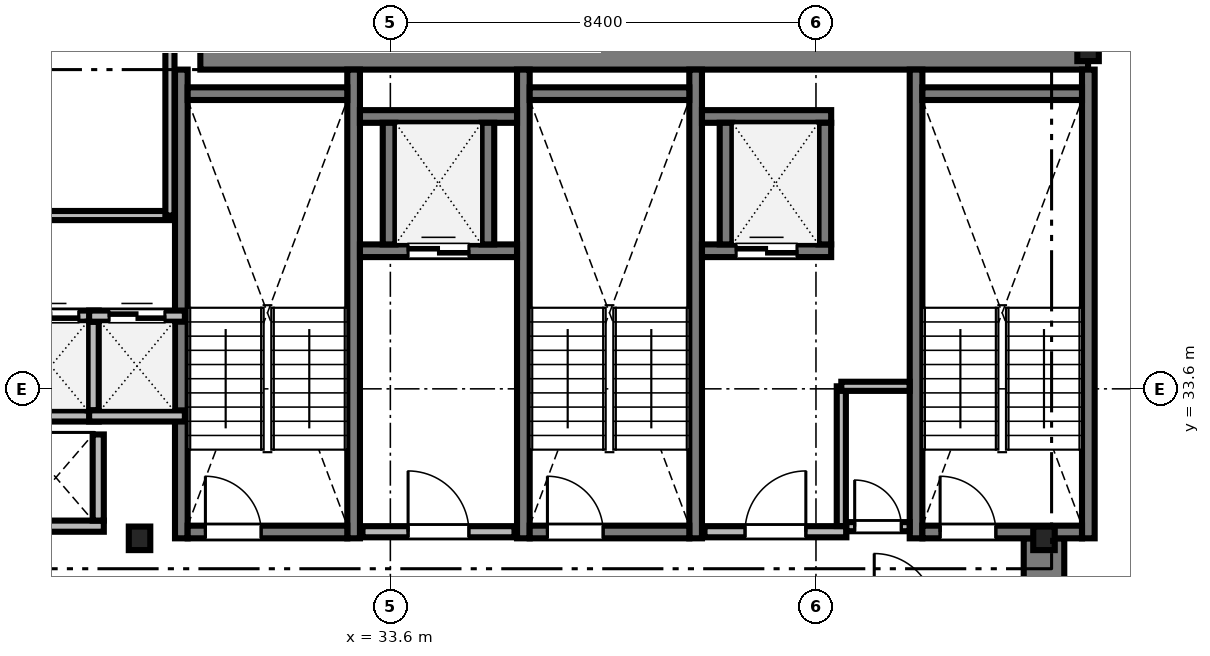
"""IFC4 building model, lengths in metres.
Left out: names, types, materials, properties, quantities, classifications, styles, units other than length and angle.
Written with IfcOpenShell. Run it as: python <this file> out.ifc"""

import sys

from ifc_helpers import new_model, si_unit, direction, frame, frame_2d, origin, origin_2d, place, context, subcontext, project, spatial, rectangle, i_section, extrude, source, transform, mapped, element, fill, save


model = new_model("IFC4")
c1 = context("Model", 3, precision=1e-05, world=origin(), true_north=direction((0.0, 1.0)))
c2 = subcontext(c1, "Body", "Model", "MODEL_VIEW")
j1 = project(units=[si_unit("LENGTHUNIT", "METRE"), si_unit("PLANEANGLEUNIT", "RADIAN")], contexts=[c1])
p1 = place(None, origin())
s1 = spatial("IfcSite", under=j1, at=p1, CompositionType="ELEMENT")
p2 = place(p1, origin())
s2 = spatial("IfcBuilding", under=s1, at=p2, CompositionType="ELEMENT")
p3 = place(p2, frame((0.0, 0.0, 152.0)))
s3 = spatial("IfcBuildingStorey", under=s2, at=p3, CompositionType="ELEMENT", Elevation=152.0)
m1 = source(origin(), c2, "Body", "SweptSolid", [
    extrude(rectangle(XDim=17.52, YDim=0.8, at=frame_2d((8.76, 0.0))), origin(), (0.0, 0.0, 1.0), 3.46),
])
p4 = place(p3, frame((29.85, 40.3, 0.0), z_axis=(0.0, 0.0, 1.0), x_axis=(1.0, 0.0, 0.0)))
e1 = element("IfcWall", 1, at=p4, inside=s3, PredefinedType="SHEAR", context=c2, shape_type="MappedRepresentation", body=[
    mapped(m1, transform((0.0, 0.0, 0.0), scale=1.0)),
])
m2 = source(origin(), c2, "Body", "SweptSolid", [
    extrude(rectangle(XDim=13.15, YDim=0.8, at=frame_2d((6.575, 0.0))), origin(), (0.0, 0.0, 1.0), 3.46),
])
p5 = place(p3, frame((46.5, 17.5, 0.0), z_axis=(0.0, 0.0, 1.0), x_axis=(0.0, 1.0, 0.0)))
e2 = element("IfcWall", 2, at=p5, inside=s3, PredefinedType="SHEAR", context=c2, shape_type="MappedRepresentation", body=[
    mapped(m2, transform((0.0, 0.0, 0.0), scale=1.0)),
])
m3 = source(origin(), c2, "Body", "SweptSolid", [
    extrude(i_section(OverallWidth=0.424, OverallDepth=0.465, WebThickness=0.035, FlangeThickness=0.056, FilletRadius=0.015, at=origin_2d()), origin(), (0.0, 0.0, 1.0), 3.46),
])
for number, where, z_axis, x_axis in (
    (3, (28.65, 30.65, 0.0), (0.0, 0.0, 1.0), (1.0, 0.0, 0.0)),
    (4, (46.5, 30.65, 0.0), (0.0, 0.0, 1.0), (1.0, 0.0, 0.0)),
    (5, (47.37, 40.3, 0.0), (0.0, 0.0, 1.0), (1.0, 0.0, 0.0)),
):
    element("IfcColumn", number, at=place(p3, frame(where, z_axis=z_axis, x_axis=x_axis)), inside=s3, PredefinedType="COLUMN", context=c2, shape_type="MappedRepresentation", body=[
        mapped(m3, transform((0.0, 0.0, 0.0), scale=1.0)),
    ])
m4 = source(origin(), c2, "Body", "SweptSolid", [
    extrude(rectangle(XDim=9.25, YDim=0.25, at=frame_2d((4.625, 0.0))), origin(), (0.0, 0.0, 1.0), 3.5),
])
for number, where, z_axis, x_axis in (
    (6, (29.475, 30.65, 0.0), (0.0, 0.0, 1.0), (0.0, 1.0, 0.0)),
    (7, (32.875, 30.65, 0.0), (0.0, 0.0, 1.0), (0.0, 1.0, 0.0)),
):
    element("IfcWall", number, at=place(p3, frame(where, z_axis=z_axis, x_axis=x_axis)), inside=s3, PredefinedType="SOLIDWALL", context=c2, shape_type="MappedRepresentation", body=[
        mapped(m4, transform((0.0, 0.0, 0.0), scale=1.0)),
    ])
m5 = source(origin(), c2, "Body", "SweptSolid", [
    extrude(rectangle(XDim=3.15, YDim=0.25, at=frame_2d((1.575, 0.0))), origin(), (0.0, 0.0, 1.0), 3.5),
])
p6 = place(p3, frame((29.6, 39.425, 0.0), z_axis=(0.0, 0.0, 1.0), x_axis=(1.0, 0.0, 0.0)))
e8 = element("IfcWall", 8, at=p6, inside=s3, PredefinedType="SOLIDWALL", context=c2, shape_type="MappedRepresentation", body=[
    mapped(m5, transform((0.0, 0.0, 0.0), scale=1.0)),
])
p7 = place(p3, frame((29.6, 30.775, 0.0), z_axis=(0.0, 0.0, 1.0), x_axis=(1.0, 0.0, 0.0)))
e9 = element("IfcWall", 9, at=p7, inside=s3, PredefinedType="SOLIDWALL", context=c2, shape_type="MappedRepresentation", body=[
    mapped(m5, transform((0.0, 0.0, 0.0), scale=1.0)),
])
m6 = source(origin(), c2, "Body", "SweptSolid", [
    extrude(rectangle(XDim=1.1, YDim=2.2, at=frame_2d((0.55, 1.1))), frame((0.0, 0.135, 0.0), z_axis=(0.0, -1.0, 0.0), x_axis=(1.0, 0.0, 0.0)), (0.0, 0.0, 1.0), 0.27),
])
p8 = place(p7, frame((0.35, 0.0, 0.0)))
e10 = element("IfcOpeningElement", 10, at=p8, cuts=e9, PredefinedType="OPENING", context=c2, shape_type="MappedRepresentation", body=[
    mapped(m6, transform((0.0, 0.0, 0.0), scale=1.0)),
])
for number, where, z_axis, x_axis in (
    (11, (36.225, 30.65, 0.0), (0.0, 0.0, 1.0), (0.0, 1.0, 0.0)),
    (12, (39.625, 30.65, 0.0), (0.0, 0.0, 1.0), (0.0, 1.0, 0.0)),
):
    element("IfcWall", number, at=place(p3, frame(where, z_axis=z_axis, x_axis=x_axis)), inside=s3, PredefinedType="SOLIDWALL", context=c2, shape_type="MappedRepresentation", body=[
        mapped(m4, transform((0.0, 0.0, 0.0), scale=1.0)),
    ])
p9 = place(p3, frame((36.35, 39.425, 0.0), z_axis=(0.0, 0.0, 1.0), x_axis=(1.0, 0.0, 0.0)))
e13 = element("IfcWall", 13, at=p9, inside=s3, PredefinedType="SOLIDWALL", context=c2, shape_type="MappedRepresentation", body=[
    mapped(m5, transform((0.0, 0.0, 0.0), scale=1.0)),
])
p10 = place(p3, frame((36.35, 30.775, 0.0), z_axis=(0.0, 0.0, 1.0), x_axis=(1.0, 0.0, 0.0)))
e14 = element("IfcWall", 14, at=p10, inside=s3, PredefinedType="SOLIDWALL", context=c2, shape_type="MappedRepresentation", body=[
    mapped(m5, transform((0.0, 0.0, 0.0), scale=1.0)),
])
p11 = place(p10, frame((0.35, 0.0, 0.0)))
e15 = element("IfcOpeningElement", 15, at=p11, cuts=e14, PredefinedType="OPENING", context=c2, shape_type="MappedRepresentation", body=[
    mapped(m6, transform((0.0, 0.0, 0.0), scale=1.0)),
])
for number, where, z_axis, x_axis in (
    (16, (43.975, 30.65, 0.0), (0.0, 0.0, 1.0), (0.0, 1.0, 0.0)),
    (17, (47.375, 30.65, 0.0), (0.0, 0.0, 1.0), (0.0, 1.0, 0.0)),
):
    element("IfcWall", number, at=place(p3, frame(where, z_axis=z_axis, x_axis=x_axis)), inside=s3, PredefinedType="SOLIDWALL", context=c2, shape_type="MappedRepresentation", body=[
        mapped(m4, transform((0.0, 0.0, 0.0), scale=1.0)),
    ])
p12 = place(p3, frame((44.1, 39.425, 0.0), z_axis=(0.0, 0.0, 1.0), x_axis=(1.0, 0.0, 0.0)))
e18 = element("IfcWall", 18, at=p12, inside=s3, PredefinedType="SOLIDWALL", context=c2, shape_type="MappedRepresentation", body=[
    mapped(m5, transform((0.0, 0.0, 0.0), scale=1.0)),
])
p13 = place(p3, frame((44.1, 30.775, 0.0), z_axis=(0.0, 0.0, 1.0), x_axis=(1.0, 0.0, 0.0)))
e19 = element("IfcWall", 19, at=p13, inside=s3, PredefinedType="SOLIDWALL", context=c2, shape_type="MappedRepresentation", body=[
    mapped(m5, transform((0.0, 0.0, 0.0), scale=1.0)),
])
p14 = place(p13, frame((0.35, 0.0, 0.0)))
e20 = element("IfcOpeningElement", 20, at=p14, cuts=e19, PredefinedType="OPENING", context=c2, shape_type="MappedRepresentation", body=[
    mapped(m6, transform((0.0, 0.0, 0.0), scale=1.0)),
])
m7 = source(origin(), c2, "Body", "SweptSolid", [
    extrude(rectangle(XDim=3.0, YDim=0.22, at=frame_2d((1.5, 0.0))), origin(), (0.0, 0.0, 1.0), 3.46),
])
p15 = place(p3, frame((33.05, 30.78, 0.0), z_axis=(0.0, 0.0, 1.0), x_axis=(1.0, 0.0, 0.0)))
e21 = element("IfcWall", 21, at=p15, inside=s3, PredefinedType="SOLIDWALL", context=c2, shape_type="MappedRepresentation", body=[
    mapped(m7, transform((0.0, 0.0, 0.0), scale=1.0)),
])
m8 = source(origin(), c2, "Body", "SweptSolid", [
    extrude(rectangle(XDim=1.2, YDim=2.2, at=frame_2d((0.6, 1.1))), frame((0.0, 0.12, 0.0), z_axis=(0.0, -1.0, 0.0), x_axis=(1.0, 0.0, 0.0)), (0.0, 0.0, 1.0), 0.24),
])
p16 = place(p15, frame((0.9, 0.0, 0.0)))
e22 = element("IfcOpeningElement", 22, at=p16, cuts=e21, PredefinedType="OPENING", context=c2, shape_type="MappedRepresentation", body=[
    mapped(m8, transform((0.0, 0.0, 0.0), scale=1.0)),
])
m9 = source(origin(), c2, "Body", "SweptSolid", [
    extrude(rectangle(XDim=2.8, YDim=0.22, at=frame_2d((1.4, 0.0))), origin(), (0.0, 0.0, 1.0), 3.46),
])
p17 = place(p3, frame((39.8, 30.78, 0.0), z_axis=(0.0, 0.0, 1.0), x_axis=(1.0, 0.0, 0.0)))
e23 = element("IfcWall", 23, at=p17, inside=s3, PredefinedType="SOLIDWALL", context=c2, shape_type="MappedRepresentation", body=[
    mapped(m9, transform((0.0, 0.0, 0.0), scale=1.0)),
])
p18 = place(p17, frame((0.8, 0.0, 0.0)))
e24 = element("IfcOpeningElement", 24, at=p18, cuts=e23, PredefinedType="OPENING", context=c2, shape_type="MappedRepresentation", body=[
    mapped(m8, transform((0.0, 0.0, 0.0), scale=1.0)),
])
m10 = source(origin(), c2, "Body", "SweptSolid", [
    extrude(rectangle(XDim=1.89, YDim=0.22, at=frame_2d((0.945, 0.0))), origin(), (0.0, 0.0, 1.0), 3.46),
])
p19 = place(p3, frame((25.955, 33.065, 0.0), z_axis=(0.0, 0.0, 1.0), x_axis=(1.0, 0.0, 0.0)))
e25 = element("IfcWall", 25, at=p19, inside=s3, PredefinedType="SOLIDWALL", context=c2, shape_type="MappedRepresentation", body=[
    mapped(m10, transform((0.0, 0.0, 0.0), scale=1.0)),
])
p20 = place(p3, frame((25.955, 35.035, 0.0), z_axis=(0.0, 0.0, 1.0), x_axis=(1.0, 0.0, 0.0)))
e26 = element("IfcWall", 26, at=p20, inside=s3, PredefinedType="SOLIDWALL", context=c2, shape_type="MappedRepresentation", body=[
    mapped(m10, transform((0.0, 0.0, 0.0), scale=1.0)),
])
m11 = source(origin(), c2, "Body", "SweptSolid", [
    extrude(rectangle(XDim=1.1, YDim=2.2, at=frame_2d((0.55, 1.1))), frame((0.0, 0.12, 0.0), z_axis=(0.0, -1.0, 0.0), x_axis=(1.0, 0.0, 0.0)), (0.0, 0.0, 1.0), 0.24),
])
p21 = place(p20, frame((0.395, 0.0, 0.0)))
e27 = element("IfcOpeningElement", 27, at=p21, cuts=e26, PredefinedType="OPENING", context=c2, shape_type="MappedRepresentation", body=[
    mapped(m11, transform((0.0, 0.0, 0.0), scale=1.0)),
])
m12 = source(origin(), c2, "Body", "SweptSolid", [
    extrude(rectangle(XDim=1.75, YDim=0.22, at=frame_2d((0.875, 0.0))), origin(), (0.0, 0.0, 1.0), 3.46),
])
p22 = place(p3, frame((27.735, 33.175, 0.0), z_axis=(0.0, 0.0, 1.0), x_axis=(0.0, 1.0, 0.0)))
e28 = element("IfcWall", 28, at=p22, inside=s3, PredefinedType="SOLIDWALL", context=c2, shape_type="MappedRepresentation", body=[
    mapped(m12, transform((0.0, 0.0, 0.0), scale=1.0)),
])
p23 = place(p3, frame((27.655, 33.065, 0.0), z_axis=(0.0, 0.0, 1.0), x_axis=(1.0, 0.0, 0.0)))
e29 = element("IfcWall", 29, at=p23, inside=s3, PredefinedType="SOLIDWALL", context=c2, shape_type="MappedRepresentation", body=[
    mapped(m10, transform((0.0, 0.0, 0.0), scale=1.0)),
])
p24 = place(p3, frame((27.655, 35.035, 0.0), z_axis=(0.0, 0.0, 1.0), x_axis=(1.0, 0.0, 0.0)))
e30 = element("IfcWall", 30, at=p24, inside=s3, PredefinedType="SOLIDWALL", context=c2, shape_type="MappedRepresentation", body=[
    mapped(m10, transform((0.0, 0.0, 0.0), scale=1.0)),
])
p25 = place(p24, frame((0.395, 0.0, 0.0)))
e31 = element("IfcOpeningElement", 31, at=p25, cuts=e30, PredefinedType="OPENING", context=c2, shape_type="MappedRepresentation", body=[
    mapped(m11, transform((0.0, 0.0, 0.0), scale=1.0)),
])
m13 = source(origin(), c2, "Body", "SweptSolid", [
    extrude(rectangle(XDim=3.1, YDim=0.25, at=frame_2d((1.55, 0.0))), origin(), (0.0, 0.0, 1.0), 3.46),
])
p26 = place(p3, frame((33.0, 36.325, 0.0), z_axis=(0.0, 0.0, 1.0), x_axis=(1.0, 0.0, 0.0)))
e32 = element("IfcWall", 32, at=p26, inside=s3, PredefinedType="SOLIDWALL", context=c2, shape_type="MappedRepresentation", body=[
    mapped(m13, transform((0.0, 0.0, 0.0), scale=1.0)),
])
m14 = source(origin(), c2, "Body", "SweptSolid", [
    extrude(rectangle(XDim=1.2, YDim=2.25, at=frame_2d((0.6, 1.125))), frame((0.0, 0.135, 0.0), z_axis=(0.0, -1.0, 0.0), x_axis=(1.0, 0.0, 0.0)), (0.0, 0.0, 1.0), 0.27),
])
p27 = place(p26, frame((0.95, 0.0, 0.0)))
e33 = element("IfcOpeningElement", 33, at=p27, cuts=e32, PredefinedType="OPENING", context=c2, shape_type="MappedRepresentation", body=[
    mapped(m14, transform((0.0, 0.0, 0.0), scale=1.0)),
])
p28 = place(p3, frame((33.0, 38.975, 0.0), z_axis=(0.0, 0.0, 1.0), x_axis=(1.0, 0.0, 0.0)))
e34 = element("IfcWall", 34, at=p28, inside=s3, PredefinedType="SOLIDWALL", context=c2, shape_type="MappedRepresentation", body=[
    mapped(m13, transform((0.0, 0.0, 0.0), scale=1.0)),
])
m15 = source(origin(), c2, "Body", "SweptSolid", [
    extrude(rectangle(XDim=2.4, YDim=0.25, at=frame_2d((1.2, 0.0))), origin(), (0.0, 0.0, 1.0), 3.46),
])
for number, where, z_axis, x_axis in (
    (35, (33.575, 36.45, 0.0), (0.0, 0.0, 1.0), (0.0, 1.0, 0.0)),
    (36, (35.525, 36.45, 0.0), (0.0, 0.0, 1.0), (0.0, 1.0, 0.0)),
):
    element("IfcWall", number, at=place(p3, frame(where, z_axis=z_axis, x_axis=x_axis)), inside=s3, PredefinedType="SOLIDWALL", context=c2, shape_type="MappedRepresentation", body=[
        mapped(m15, transform((0.0, 0.0, 0.0), scale=1.0)),
    ])
m16 = source(origin(), c2, "Body", "SweptSolid", [
    extrude(rectangle(XDim=2.55, YDim=0.25, at=frame_2d((1.275, 0.0))), origin(), (0.0, 0.0, 1.0), 3.46),
])
p29 = place(p3, frame((39.75, 36.325, 0.0), z_axis=(0.0, 0.0, 1.0), x_axis=(1.0, 0.0, 0.0)))
e37 = element("IfcWall", 37, at=p29, inside=s3, PredefinedType="SOLIDWALL", context=c2, shape_type="MappedRepresentation", body=[
    mapped(m16, transform((0.0, 0.0, 0.0), scale=1.0)),
])
p30 = place(p29, frame((0.675, 0.0, 0.0)))
e38 = element("IfcOpeningElement", 38, at=p30, cuts=e37, PredefinedType="OPENING", context=c2, shape_type="MappedRepresentation", body=[
    mapped(m14, transform((0.0, 0.0, 0.0), scale=1.0)),
])
p31 = place(p3, frame((39.75, 38.975, 0.0), z_axis=(0.0, 0.0, 1.0), x_axis=(1.0, 0.0, 0.0)))
e39 = element("IfcWall", 39, at=p31, inside=s3, PredefinedType="SOLIDWALL", context=c2, shape_type="MappedRepresentation", body=[
    mapped(m16, transform((0.0, 0.0, 0.0), scale=1.0)),
])
for number, where, z_axis, x_axis in (
    (40, (40.225, 36.45, 0.0), (0.0, 0.0, 1.0), (0.0, 1.0, 0.0)),
    (41, (42.175, 36.45, 0.0), (0.0, 0.0, 1.0), (0.0, 1.0, 0.0)),
):
    element("IfcWall", number, at=place(p3, frame(where, z_axis=z_axis, x_axis=x_axis)), inside=s3, PredefinedType="SOLIDWALL", context=c2, shape_type="MappedRepresentation", body=[
        mapped(m15, transform((0.0, 0.0, 0.0), scale=1.0)),
    ])
m17 = source(origin(), c2, "Body", "SweptSolid", [
    extrude(rectangle(XDim=1.89, YDim=0.22, at=frame_2d((0.945, 0.0))), origin(), (0.0, 0.0, 1.0), 3.46),
])
p32 = place(p3, frame((26.055, 30.89, 0.0), z_axis=(0.0, 0.0, 1.0), x_axis=(1.0, 0.0, 0.0)))
e42 = element("IfcWall", 42, at=p32, inside=s3, PredefinedType="SOLIDWALL", context=c2, shape_type="MappedRepresentation", body=[
    mapped(m17, transform((0.0, 0.0, 0.0), scale=1.0)),
])
m18 = source(origin(), c2, "Body", "SweptSolid", [
    extrude(rectangle(XDim=1.7, YDim=0.22, at=frame_2d((0.85, 0.0))), origin(), (0.0, 0.0, 1.0), 3.46),
])
p33 = place(p3, frame((27.835, 31.0, 0.0), z_axis=(0.0, 0.0, 1.0), x_axis=(0.0, 1.0, 0.0)))
e43 = element("IfcWall", 43, at=p33, inside=s3, PredefinedType="SOLIDWALL", context=c2, shape_type="MappedRepresentation", body=[
    mapped(m18, transform((0.0, 0.0, 0.0), scale=1.0)),
])
m19 = source(origin(), c2, "Body", "SweptSolid", [
    extrude(rectangle(XDim=22.328, YDim=0.18, at=frame_2d((11.164, 0.0))), origin(), (0.0, 0.0, 1.0), 2.702),
])
p34 = place(p3, frame((6.922, 37.02, 0.0), z_axis=(0.0, 0.0, 1.0), x_axis=(1.0, 0.0, 0.0)))
e44 = element("IfcWall", 44, at=p34, inside=s3, PredefinedType="PARTITIONING", context=c2, shape_type="MappedRepresentation", body=[
    mapped(m19, transform((0.0, 0.0, 0.0), scale=1.0)),
])
m20 = source(origin(), c2, "Body", "SweptSolid", [
    extrude(rectangle(XDim=1.05, YDim=2.2, at=frame_2d((0.525, 1.1))), frame((0.0, 0.1, 0.0), z_axis=(0.0, -1.0, 0.0), x_axis=(1.0, 0.0, 0.0)), (0.0, 0.0, 1.0), 0.2),
])
p35 = place(p34, frame((14.928, 0.0, 0.0)))
e45 = element("IfcOpeningElement", 45, at=p35, cuts=e44, PredefinedType="OPENING", context=c2, shape_type="MappedRepresentation", body=[
    mapped(m20, transform((0.0, 0.0, 0.0), scale=1.0)),
])
m21 = source(origin(), c2, "Body", "SweptSolid", [
    extrude(rectangle(XDim=1.248, YDim=0.18, at=frame_2d((0.624, 0.0))), origin(), (0.0, 0.0, 1.0), 3.46),
])
p36 = place(p3, frame((42.6, 30.88, 0.0), z_axis=(0.0, 0.0, 1.0), x_axis=(1.0, 0.0, 0.0)))
e46 = element("IfcWall", 46, at=p36, inside=s3, PredefinedType="PARTITIONING", context=c2, shape_type="MappedRepresentation", body=[
    mapped(m21, transform((0.0, 0.0, 0.0), scale=1.0)),
])
m22 = source(origin(), c2, "Body", "SweptSolid", [
    extrude(rectangle(XDim=0.92, YDim=2.1, at=frame_2d((0.46, 1.05))), frame((0.0, 0.1, 0.0), z_axis=(0.0, -1.0, 0.0), x_axis=(1.0, 0.0, 0.0)), (0.0, 0.0, 1.0), 0.2),
])
p37 = place(p36, frame((0.164, 0.0, 0.0)))
e47 = element("IfcOpeningElement", 47, at=p37, cuts=e46, PredefinedType="OPENING", context=c2, shape_type="MappedRepresentation", body=[
    mapped(m22, transform((0.0, 0.0, 0.0), scale=1.0)),
])
m23 = source(origin(), c2, "Body", "SweptSolid", [
    extrude(rectangle(XDim=11.45, YDim=0.18, at=frame_2d((5.725, 0.0))), origin(), (0.0, 0.0, 1.0), 2.702),
])
p38 = place(p3, frame((29.25, 37.02, 0.0), z_axis=(0.0, 0.0, 1.0), x_axis=(0.0, 1.0, 0.0)))
e48 = element("IfcWall", 48, at=p38, inside=s3, PredefinedType="PARTITIONING", context=c2, shape_type="MappedRepresentation", body=[
    mapped(m23, transform((0.0, 0.0, 0.0), scale=1.0)),
])
m24 = source(origin(), c2, "Body", "SweptSolid", [
    extrude(rectangle(XDim=2.758, YDim=0.18, at=frame_2d((1.379, 0.0))), origin(), (0.0, 0.0, 1.0), 3.46),
])
p39 = place(p3, frame((42.5, 30.892, 0.0), z_axis=(0.0, 0.0, 1.0), x_axis=(0.0, 1.0, 0.0)))
e49 = element("IfcWall", 49, at=p39, inside=s3, PredefinedType="PARTITIONING", context=c2, shape_type="MappedRepresentation", body=[
    mapped(m24, transform((0.0, 0.0, 0.0), scale=1.0)),
])
m25 = source(origin(), c2, "Body", "SweptSolid", [
    extrude(rectangle(XDim=1.348, YDim=0.18, at=frame_2d((0.674, 0.0))), origin(), (0.0, 0.0, 1.0), 3.46),
])
p40 = place(p3, frame((42.5, 33.65, 0.0), z_axis=(0.0, 0.0, 1.0), x_axis=(1.0, 0.0, 0.0)))
e50 = element("IfcWall", 50, at=p40, inside=s3, PredefinedType="PARTITIONING", context=c2, shape_type="MappedRepresentation", body=[
    mapped(m25, transform((0.0, 0.0, 0.0), scale=1.0)),
])
m26 = source(origin(), c2, "Body", "SweptSolid", [
    extrude(rectangle(XDim=1.1, YDim=2.2, at=frame_2d((0.55, 1.1))), frame((0.0, 0.025, 0.0), z_axis=(0.0, -1.0, 0.0), x_axis=(1.0, 0.0, 0.0)), (0.0, 0.0, 1.0), 0.05),
])
p41 = place(p8, origin())
e51 = element("IfcDoor", 51, at=p41, inside=s3, OperationType="SINGLE_SWING_LEFT", PredefinedType="DOOR", context=c2, shape_type="MappedRepresentation", body=[
    mapped(m26, transform((0.0, 0.0, 0.0), scale=1.0)),
])
fill(e10, e51)
p42 = place(p11, origin())
e52 = element("IfcDoor", 52, at=p42, inside=s3, OperationType="SINGLE_SWING_LEFT", PredefinedType="DOOR", context=c2, shape_type="MappedRepresentation", body=[
    mapped(m26, transform((0.0, 0.0, 0.0), scale=1.0)),
])
fill(e15, e52)
p43 = place(p14, origin())
e53 = element("IfcDoor", 53, at=p43, inside=s3, OperationType="SINGLE_SWING_LEFT", PredefinedType="DOOR", context=c2, shape_type="MappedRepresentation", body=[
    mapped(m26, transform((0.0, 0.0, 0.0), scale=1.0)),
])
fill(e20, e53)
m27 = source(origin(), c2, "Body", "SweptSolid", [
    extrude(rectangle(XDim=1.2, YDim=2.2, at=frame_2d((0.6, 1.1))), frame((0.0, 0.025, 0.0), z_axis=(0.0, -1.0, 0.0), x_axis=(1.0, 0.0, 0.0)), (0.0, 0.0, 1.0), 0.05),
])
p44 = place(p16, origin())
e54 = element("IfcDoor", 54, at=p44, inside=s3, OperationType="SINGLE_SWING_LEFT", PredefinedType="DOOR", context=c2, shape_type="MappedRepresentation", body=[
    mapped(m27, transform((0.0, 0.0, 0.0), scale=1.0)),
])
fill(e22, e54)
p45 = place(p18, origin())
e55 = element("IfcDoor", 55, at=p45, inside=s3, OperationType="SINGLE_SWING_RIGHT", PredefinedType="DOOR", context=c2, shape_type="MappedRepresentation", body=[
    mapped(m27, transform((0.0, 0.0, 0.0), scale=1.0)),
])
fill(e24, e55)
p46 = place(p21, origin())
e56 = element("IfcDoor", 56, at=p46, inside=s3, OperationType="DOUBLE_DOOR_SLIDING", PredefinedType="DOOR", context=c2, shape_type="MappedRepresentation", body=[
    mapped(m26, transform((0.0, 0.0, 0.0), scale=1.0)),
])
fill(e27, e56)
p47 = place(p25, origin())
e57 = element("IfcDoor", 57, at=p47, inside=s3, OperationType="DOUBLE_DOOR_SLIDING", PredefinedType="DOOR", context=c2, shape_type="MappedRepresentation", body=[
    mapped(m26, transform((0.0, 0.0, 0.0), scale=1.0)),
])
fill(e31, e57)
m28 = source(origin(), c2, "Body", "SweptSolid", [
    extrude(rectangle(XDim=1.2, YDim=2.25, at=frame_2d((0.6, 1.125))), frame((0.0, 0.025, 0.0), z_axis=(0.0, -1.0, 0.0), x_axis=(1.0, 0.0, 0.0)), (0.0, 0.0, 1.0), 0.05),
])
p48 = place(p27, origin())
e58 = element("IfcDoor", 58, at=p48, inside=s3, OperationType="DOUBLE_DOOR_SLIDING", PredefinedType="DOOR", context=c2, shape_type="MappedRepresentation", body=[
    mapped(m28, transform((0.0, 0.0, 0.0), scale=1.0)),
])
fill(e33, e58)
p49 = place(p30, origin())
e59 = element("IfcDoor", 59, at=p49, inside=s3, OperationType="DOUBLE_DOOR_SLIDING", PredefinedType="DOOR", context=c2, shape_type="MappedRepresentation", body=[
    mapped(m28, transform((0.0, 0.0, 0.0), scale=1.0)),
])
fill(e38, e59)
m29 = source(origin(), c2, "Body", "SweptSolid", [
    extrude(rectangle(XDim=0.92, YDim=2.1, at=frame_2d((0.46, 1.05))), frame((0.0, 0.025, 0.0), z_axis=(0.0, -1.0, 0.0), x_axis=(1.0, 0.0, 0.0)), (0.0, 0.0, 1.0), 0.05),
])
p50 = place(p37, origin())
e60 = element("IfcDoor", 60, at=p50, inside=s3, OperationType="SINGLE_SWING_LEFT", PredefinedType="DOOR", context=c2, shape_type="MappedRepresentation", body=[
    mapped(m29, transform((0.0, 0.0, 0.0), scale=1.0)),
])
fill(e47, e60)
save(model, sys.argv[1])
